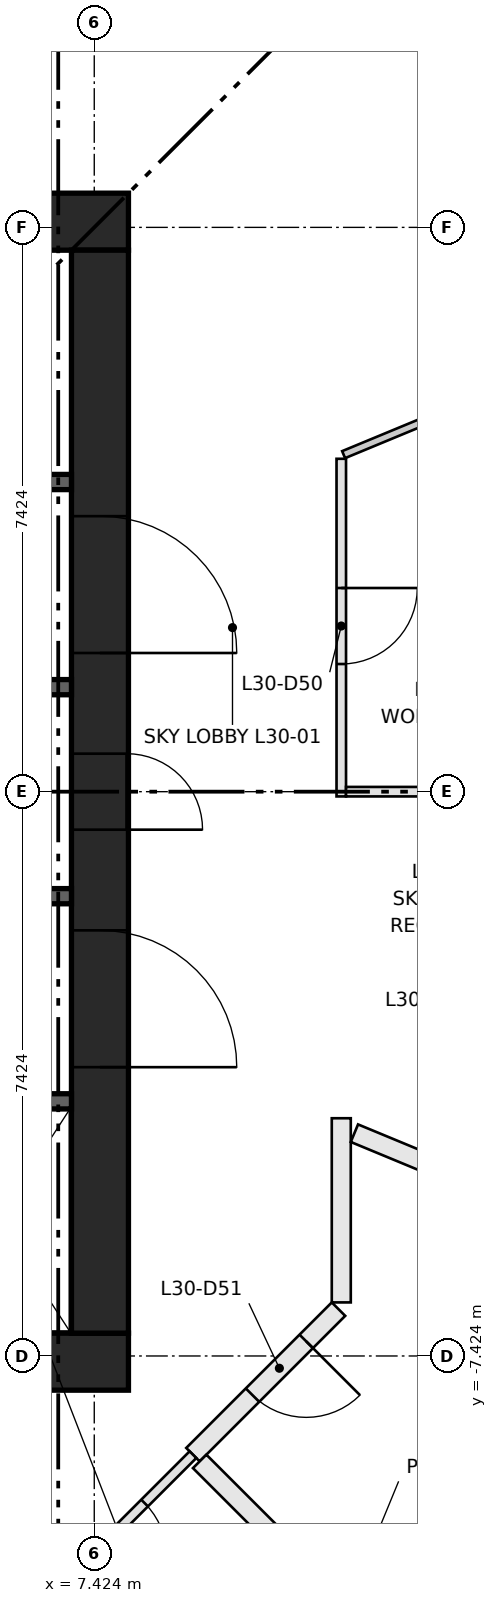
"""IFC4 building model, lengths in metres.
Left out: names, types, materials, properties, quantities, classifications, styles, units other than length and angle.
Written with IfcOpenShell. Run it as: python <this file> out.ifc"""

import sys

from ifc_helpers import new_model, si_unit, direction, frame, frame_2d, origin, place, context, subcontext, project, spatial, rectangle, extrude, element, fill, save


model = new_model("IFC4")
c1 = context("Model", 3, precision=1e-05, world=origin(), true_north=direction((0.0, 1.0)))
c2 = subcontext(c1, "Body", "Model", "MODEL_VIEW")
j1 = project(units=[si_unit("LENGTHUNIT", "METRE"), si_unit("PLANEANGLEUNIT", "RADIAN")], contexts=[c1])
p1 = place(None, origin())
s1 = spatial("IfcSite", under=j1, at=p1, CompositionType="ELEMENT")
p2 = place(p1, origin())
s2 = spatial("IfcBuilding", under=s1, at=p2, CompositionType="ELEMENT")
p3 = place(p2, frame((0.0, 0.0, 116.55)))
s3 = spatial("IfcBuildingStorey", under=s2, at=p3, CompositionType="ELEMENT", Elevation=116.55)
for number, where, z_axis, x_axis in (
    (1, (-7.874, -7.499, 0.0), (0.0, 0.0, 1.0), (1.0, 0.0, 0.0)),
    (2, (-7.874, 7.499, 0.0), (0.0, 0.0, 1.0), (1.0, 0.0, 0.0)),
):
    element("IfcWall", number, at=place(p3, frame(where, z_axis=z_axis, x_axis=x_axis)), inside=s3, PredefinedType="SHEAR", context=c2, shape_type="SweptSolid", body=[
        extrude(rectangle(XDim=15.748, YDim=0.75, at=frame_2d((7.874, 0.0))), origin(), (0.0, 0.0, 1.0), 4.4),
    ])
p4 = place(p3, frame((7.499, -7.124, 0.0), z_axis=(0.0, 0.0, 1.0), x_axis=(0.0, 1.0, 0.0)))
e3 = element("IfcWall", 3, at=p4, inside=s3, PredefinedType="SHEAR", context=c2, shape_type="SweptSolid", body=[
    extrude(rectangle(XDim=14.248, YDim=0.75, at=frame_2d((7.124, 0.0))), origin(), (0.0, 0.0, 1.0), 4.4),
])
p5 = place(p4, frame((6.624, 0.0, 0.0)))
e4 = element("IfcOpeningElement", 4, at=p5, cuts=e3, PredefinedType="OPENING", context=c2, shape_type="SweptSolid", body=[
    extrude(rectangle(XDim=1.0, YDim=2.1, at=frame_2d((0.5, 1.05))), frame((0.0, 0.385, 0.0), z_axis=(0.0, -1.0, 0.0), x_axis=(1.0, 0.0, 0.0)), (0.0, 0.0, 1.0), 0.77),
])
p6 = place(p4, frame((3.5, 0.0, 0.0)))
e5 = element("IfcOpeningElement", 5, at=p6, cuts=e3, PredefinedType="OPENING", context=c2, shape_type="SweptSolid", body=[
    extrude(rectangle(XDim=1.8, YDim=2.1, at=frame_2d((0.9, 1.05))), frame((0.0, 0.385, 0.0), z_axis=(0.0, -1.0, 0.0), x_axis=(1.0, 0.0, 0.0)), (0.0, 0.0, 1.0), 0.77),
])
p7 = place(p4, frame((8.948, 0.0, 0.0)))
e6 = element("IfcOpeningElement", 6, at=p7, cuts=e3, PredefinedType="OPENING", context=c2, shape_type="SweptSolid", body=[
    extrude(rectangle(XDim=1.8, YDim=2.1, at=frame_2d((0.9, 1.05))), frame((0.0, 0.385, 0.0), z_axis=(0.0, -1.0, 0.0), x_axis=(1.0, 0.0, 0.0)), (0.0, 0.0, 1.0), 0.77),
])
p8 = place(p3, frame((-7.124, -4.074, 0.0), z_axis=(0.0, 0.0, 1.0), x_axis=(1.0, 0.0, 0.0)))
e7 = element("IfcWall", 7, at=p8, inside=s3, PredefinedType="SHEAR", context=c2, shape_type="SweptSolid", body=[
    extrude(rectangle(XDim=14.248, YDim=0.2, at=frame_2d((7.124, 0.0))), origin(), (0.0, 0.0, 1.0), 4.05),
])
p9 = place(p8, frame((1.069, 0.0, 0.0)))
e8 = element("IfcOpeningElement", 8, at=p9, cuts=e7, PredefinedType="OPENING", context=c2, shape_type="SweptSolid", body=[
    extrude(rectangle(XDim=1.1, YDim=2.1, at=frame_2d((0.55, 1.05))), frame((0.0, 0.11, 0.0), z_axis=(0.0, -1.0, 0.0), x_axis=(1.0, 0.0, 0.0)), (0.0, 0.0, 1.0), 0.22),
])
p10 = place(p8, frame((4.206, 0.0, 0.0)))
e9 = element("IfcOpeningElement", 9, at=p10, cuts=e7, PredefinedType="OPENING", context=c2, shape_type="SweptSolid", body=[
    extrude(rectangle(XDim=1.1, YDim=2.1, at=frame_2d((0.55, 1.05))), frame((0.0, 0.11, 0.0), z_axis=(0.0, -1.0, 0.0), x_axis=(1.0, 0.0, 0.0)), (0.0, 0.0, 1.0), 0.22),
])
p11 = place(p8, frame((6.808, 0.0, 0.0)))
e10 = element("IfcOpeningElement", 10, at=p11, cuts=e7, PredefinedType="OPENING", context=c2, shape_type="SweptSolid", body=[
    extrude(rectangle(XDim=1.0, YDim=2.1, at=frame_2d((0.5, 1.05))), frame((0.0, 0.11, 0.0), z_axis=(0.0, -1.0, 0.0), x_axis=(1.0, 0.0, 0.0)), (0.0, 0.0, 1.0), 0.22),
])
p12 = place(p8, frame((8.777, 0.0, 0.0)))
e11 = element("IfcOpeningElement", 11, at=p12, cuts=e7, PredefinedType="OPENING", context=c2, shape_type="SweptSolid", body=[
    extrude(rectangle(XDim=1.0, YDim=2.1, at=frame_2d((0.5, 1.05))), frame((0.0, 0.11, 0.0), z_axis=(0.0, -1.0, 0.0), x_axis=(1.0, 0.0, 0.0)), (0.0, 0.0, 1.0), 0.22),
])
p13 = place(p8, frame((10.745, 0.0, 0.0)))
e12 = element("IfcOpeningElement", 12, at=p13, cuts=e7, PredefinedType="OPENING", context=c2, shape_type="SweptSolid", body=[
    extrude(rectangle(XDim=1.0, YDim=2.1, at=frame_2d((0.5, 1.05))), frame((0.0, 0.11, 0.0), z_axis=(0.0, -1.0, 0.0), x_axis=(1.0, 0.0, 0.0)), (0.0, 0.0, 1.0), 0.22),
])
p14 = place(p8, frame((12.714, 0.0, 0.0)))
e13 = element("IfcOpeningElement", 13, at=p14, cuts=e7, PredefinedType="OPENING", context=c2, shape_type="SweptSolid", body=[
    extrude(rectangle(XDim=1.0, YDim=2.1, at=frame_2d((0.5, 1.05))), frame((0.0, 0.11, 0.0), z_axis=(0.0, -1.0, 0.0), x_axis=(1.0, 0.0, 0.0)), (0.0, 0.0, 1.0), 0.22),
])
p15 = place(p3, frame((0.0, 4.074, 0.0), z_axis=(0.0, 0.0, 1.0), x_axis=(1.0, 0.0, 0.0)))
e14 = element("IfcWall", 14, at=p15, inside=s3, PredefinedType="SHEAR", context=c2, shape_type="SweptSolid", body=[
    extrude(rectangle(XDim=7.124, YDim=0.2, at=frame_2d((3.562, 0.0))), origin(), (0.0, 0.0, 1.0), 4.05),
])
p16 = place(p15, frame((0.384, 0.0, 0.0)))
e15 = element("IfcOpeningElement", 15, at=p16, cuts=e14, PredefinedType="OPENING", context=c2, shape_type="SweptSolid", body=[
    extrude(rectangle(XDim=1.0, YDim=2.1, at=frame_2d((0.5, 1.05))), frame((0.0, 0.11, 0.0), z_axis=(0.0, -1.0, 0.0), x_axis=(1.0, 0.0, 0.0)), (0.0, 0.0, 1.0), 0.22),
])
p17 = place(p15, frame((2.153, 0.0, 0.0)))
e16 = element("IfcOpeningElement", 16, at=p17, cuts=e14, PredefinedType="OPENING", context=c2, shape_type="SweptSolid", body=[
    extrude(rectangle(XDim=1.0, YDim=2.1, at=frame_2d((0.5, 1.05))), frame((0.0, 0.11, 0.0), z_axis=(0.0, -1.0, 0.0), x_axis=(1.0, 0.0, 0.0)), (0.0, 0.0, 1.0), 0.22),
])
p18 = place(p15, frame((3.921, 0.0, 0.0)))
e17 = element("IfcOpeningElement", 17, at=p18, cuts=e14, PredefinedType="OPENING", context=c2, shape_type="SweptSolid", body=[
    extrude(rectangle(XDim=1.0, YDim=2.1, at=frame_2d((0.5, 1.05))), frame((0.0, 0.11, 0.0), z_axis=(0.0, -1.0, 0.0), x_axis=(1.0, 0.0, 0.0)), (0.0, 0.0, 1.0), 0.22),
])
p19 = place(p15, frame((5.79, 0.0, 0.0)))
e18 = element("IfcOpeningElement", 18, at=p19, cuts=e14, PredefinedType="OPENING", context=c2, shape_type="SweptSolid", body=[
    extrude(rectangle(XDim=0.8, YDim=2.1, at=frame_2d((0.4, 1.05))), frame((0.0, 0.11, 0.0), z_axis=(0.0, -1.0, 0.0), x_axis=(1.0, 0.0, 0.0)), (0.0, 0.0, 1.0), 0.22),
])
for number, where, z_axis, x_axis in (
    (19, (4.374, -1.375, 0.0), (0.0, 0.0, 1.0), (1.0, 0.0, 0.0)),
    (20, (4.374, 1.375, 0.0), (0.0, 0.0, 1.0), (1.0, 0.0, 0.0)),
):
    element("IfcWall", number, at=place(p3, frame(where, z_axis=z_axis, x_axis=x_axis)), inside=s3, PredefinedType="SHEAR", context=c2, shape_type="SweptSolid", body=[
        extrude(rectangle(XDim=2.75, YDim=0.2, at=frame_2d((1.375, 0.0))), origin(), (0.0, 0.0, 1.0), 4.05),
    ])
p20 = place(p3, frame((10.674, 4.379, 0.0), z_axis=(0.0, 0.0, 1.0), x_axis=(0.0, -1.0, 0.0)))
e21 = element("IfcWall", 21, at=p20, inside=s3, PredefinedType="PARTITIONING", context=c2, shape_type="SweptSolid", body=[
    extrude(rectangle(XDim=4.442, YDim=0.125, at=frame_2d((2.221, 0.0))), origin(), (0.0, 0.0, 1.0), 4.05),
])
p21 = place(p20, frame((1.7, 0.0, 0.0)))
e22 = element("IfcOpeningElement", 22, at=p21, cuts=e21, PredefinedType="OPENING", context=c2, shape_type="SweptSolid", body=[
    extrude(rectangle(XDim=1.0, YDim=2.1, at=frame_2d((0.5, 1.05))), frame((0.0, 0.073, 0.0), z_axis=(0.0, -1.0, 0.0), x_axis=(1.0, 0.0, 0.0)), (0.0, 0.0, 1.0), 0.145),
])
p22 = place(p3, frame((10.637, -6.808, 0.0), z_axis=(0.0, 0.0, 1.0), x_axis=(-0.707151855722, -0.707061703777, 0.0)))
e23 = element("IfcWall", 23, at=p22, inside=s3, PredefinedType="PARTITIONING", context=c2, shape_type="SweptSolid", body=[
    extrude(rectangle(XDim=2.708, YDim=0.25, at=frame_2d((1.354, 0.0))), origin(), (0.0, 0.0, 1.0), 4.05),
])
p23 = place(p22, frame((0.6, 0.0, 0.0)))
e24 = element("IfcOpeningElement", 24, at=p23, cuts=e23, PredefinedType="OPENING", context=c2, shape_type="SweptSolid", body=[
    extrude(rectangle(XDim=1.0, YDim=2.1, at=frame_2d((0.5, 1.05))), frame((0.0, 0.135, 0.0), z_axis=(0.0, -1.0, 0.0), x_axis=(1.0, 0.0, 0.0)), (0.0, 0.0, 1.0), 0.27),
])
p24 = place(p3, frame((10.674, -4.296, 0.0), z_axis=(0.0, 0.0, 1.0), x_axis=(0.0, -1.0, 0.0)))
e25 = element("IfcWall", 25, at=p24, inside=s3, PredefinedType="PARTITIONING", context=c2, shape_type="SweptSolid", body=[
    extrude(rectangle(XDim=2.423, YDim=0.25, at=frame_2d((1.211, 0.0))), origin(), (0.0, 0.0, 1.0), 4.05),
])
p25 = place(p3, frame((8.722, -8.722, 0.0), z_axis=(0.0, 0.0, 1.0), x_axis=(-0.707062130741, -0.707151428813, 0.0)))
e26 = element("IfcWall", 26, at=p25, inside=s3, PredefinedType="PARTITIONING", context=c2, shape_type="SweptSolid", body=[
    extrude(rectangle(XDim=2.734, YDim=0.125, at=frame_2d((1.367, 0.0))), origin(), (0.0, 0.0, 1.0), 4.05),
])
p26 = place(p25, frame((0.9, 0.0, 0.0)))
e27 = element("IfcOpeningElement", 27, at=p26, cuts=e26, PredefinedType="OPENING", context=c2, shape_type="SweptSolid", body=[
    extrude(rectangle(XDim=1.0, YDim=2.1, at=frame_2d((0.5, 1.05))), frame((0.0, 0.073, 0.0), z_axis=(0.0, -1.0, 0.0), x_axis=(1.0, 0.0, 0.0)), (0.0, 0.0, 1.0), 0.145),
])
p27 = place(p3, frame((10.705, 4.434, 0.0), z_axis=(0.0, 0.0, 1.0), x_axis=(0.923887998679, 0.382662992588, 0.0)))
e28 = element("IfcWall", 28, at=p27, inside=s3, PredefinedType="PARTITIONING", context=c2, shape_type="SweptSolid", body=[
    extrude(rectangle(XDim=1.963, YDim=0.1, at=frame_2d((0.981, 0.0))), origin(), (0.0, 0.0, 1.0), 4.05),
])
p28 = place(p3, frame((13.55, 0.0, 0.0), z_axis=(0.0, 0.0, 1.0), x_axis=(-1.0, 0.0, 0.0)))
e29 = element("IfcWall", 29, at=p28, inside=s3, PredefinedType="PARTITIONING", context=c2, shape_type="SweptSolid", body=[
    extrude(rectangle(XDim=2.813, YDim=0.125, at=frame_2d((1.407, 0.0))), origin(), (0.0, 0.0, 1.0), 4.05),
])
p29 = place(p3, frame((8.811, -8.811, 0.0), z_axis=(0.0, 0.0, 1.0), x_axis=(0.707106781187, -0.707106781187, 0.0)))
e30 = element("IfcWall", 30, at=p29, inside=s3, PredefinedType="PARTITIONING", context=c2, shape_type="SweptSolid", body=[
    extrude(rectangle(XDim=5.46, YDim=0.25, at=frame_2d((2.73, 0.0))), origin(), (0.0, 0.0, 1.0), 4.05),
])
p30 = place(p3, frame((10.847, -4.493, 0.0), z_axis=(0.0, 0.0, 1.0), x_axis=(0.923905024937, -0.382621882407, 0.0)))
e31 = element("IfcWall", 31, at=p30, inside=s3, PredefinedType="PARTITIONING", context=c2, shape_type="SweptSolid", body=[
    extrude(rectangle(XDim=1.81, YDim=0.25, at=frame_2d((0.905, 0.0))), origin(), (0.0, 0.0, 1.0), 4.05),
])
p31 = place(p5, frame((1.0, 0.0, 0.0), z_axis=(0.0, 0.0, 1.0), x_axis=(-1.0, 0.0, 0.0)))
e32 = element("IfcDoor", 32, at=p31, inside=s3, OperationType="SINGLE_SWING_LEFT", PredefinedType="DOOR", context=c2, shape_type="SweptSolid", body=[
    extrude(rectangle(XDim=1.0, YDim=2.1, at=frame_2d((0.5, 1.05))), frame((0.0, 0.375, 0.0), z_axis=(0.0, -1.0, 0.0), x_axis=(1.0, 0.0, 0.0)), (0.0, 0.0, 1.0), 0.05),
])
fill(e4, e32)
p32 = place(p6, frame((1.8, 0.0, 0.0), z_axis=(0.0, 0.0, 1.0), x_axis=(-1.0, 0.0, 0.0)))
e33 = element("IfcDoor", 33, at=p32, inside=s3, OperationType="DOUBLE_DOOR_SINGLE_SWING", PredefinedType="DOOR", context=c2, shape_type="SweptSolid", body=[
    extrude(rectangle(XDim=1.8, YDim=2.1, at=frame_2d((0.9, 1.05))), frame((0.0, 0.025, 0.0), z_axis=(0.0, -1.0, 0.0), x_axis=(1.0, 0.0, 0.0)), (0.0, 0.0, 1.0), 0.05),
])
fill(e5, e33)
p33 = place(p7, frame((1.8, 0.0, 0.0), z_axis=(0.0, 0.0, 1.0), x_axis=(-1.0, 0.0, 0.0)))
e34 = element("IfcDoor", 34, at=p33, inside=s3, OperationType="DOUBLE_DOOR_SINGLE_SWING", PredefinedType="DOOR", context=c2, shape_type="SweptSolid", body=[
    extrude(rectangle(XDim=1.8, YDim=2.1, at=frame_2d((0.9, 1.05))), frame((0.0, 0.025, 0.0), z_axis=(0.0, -1.0, 0.0), x_axis=(1.0, 0.0, 0.0)), (0.0, 0.0, 1.0), 0.05),
])
fill(e6, e34)
p34 = place(p21, origin())
e35 = element("IfcDoor", 35, at=p34, inside=s3, OperationType="SINGLE_SWING_LEFT", PredefinedType="DOOR", context=c2, shape_type="SweptSolid", body=[
    extrude(rectangle(XDim=1.0, YDim=2.1, at=frame_2d((0.5, 1.05))), frame((0.0, 0.025, 0.0), z_axis=(0.0, -1.0, 0.0), x_axis=(1.0, 0.0, 0.0)), (0.0, 0.0, 1.0), 0.05),
])
fill(e22, e35)
p35 = place(p23, origin())
e36 = element("IfcDoor", 36, at=p35, inside=s3, OperationType="SINGLE_SWING_LEFT", PredefinedType="DOOR", context=c2, shape_type="SweptSolid", body=[
    extrude(rectangle(XDim=1.0, YDim=2.1, at=frame_2d((0.5, 1.05))), frame((0.0, 0.025, 0.0), z_axis=(0.0, -1.0, 0.0), x_axis=(1.0, 0.0, 0.0)), (0.0, 0.0, 1.0), 0.05),
])
fill(e24, e36)
p36 = place(p26, origin())
e37 = element("IfcDoor", 37, at=p36, inside=s3, OperationType="SINGLE_SWING_RIGHT", PredefinedType="DOOR", context=c2, shape_type="SweptSolid", body=[
    extrude(rectangle(XDim=1.0, YDim=2.1, at=frame_2d((0.5, 1.05))), frame((0.0, 0.025, 0.0), z_axis=(0.0, -1.0, 0.0), x_axis=(1.0, 0.0, 0.0)), (0.0, 0.0, 1.0), 0.05),
])
fill(e27, e37)
save(model, sys.argv[1])
